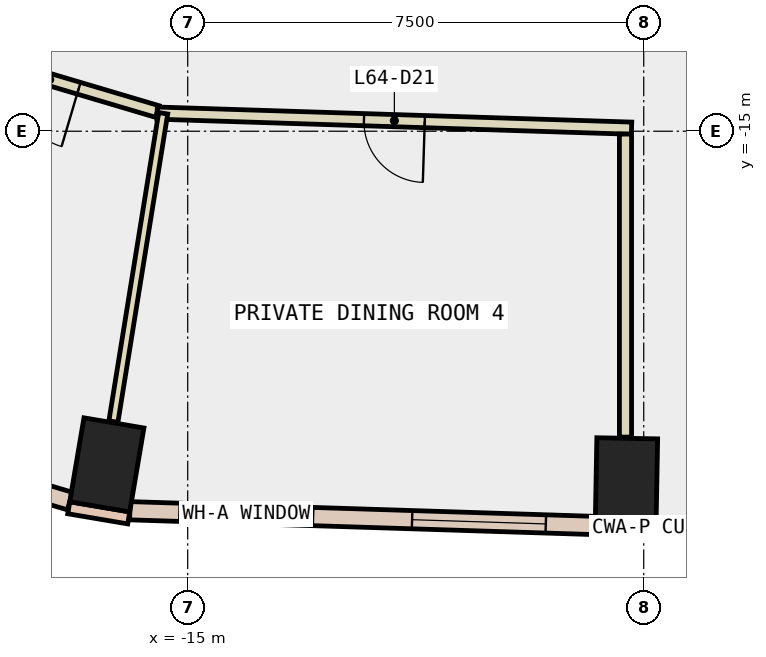
"""IFC4 building model, lengths in metres.
Left out: names, types, materials, properties, quantities, classifications, styles, units other than length and angle.
Written with IfcOpenShell. Run it as: python <this file> out.ifc"""

import sys

from ifc_helpers import new_model, si_unit, direction, frame, frame_2d, origin, origin_2d, place, context, subcontext, project, spatial, rectangle, extrude, element, fill, save


model = new_model("IFC4")
c1 = context("Model", 3, precision=1e-05, world=origin(), true_north=direction((0.0, 1.0)))
c2 = subcontext(c1, "Body", "Model", "MODEL_VIEW")
j1 = project(units=[si_unit("LENGTHUNIT", "METRE"), si_unit("PLANEANGLEUNIT", "RADIAN")], contexts=[c1])
p1 = place(None, origin())
s1 = spatial("IfcSite", under=j1, at=p1, CompositionType="ELEMENT")
p2 = place(p1, origin())
s2 = spatial("IfcBuilding", under=s1, at=p2, CompositionType="ELEMENT")
p3 = place(p2, frame((0.0, 0.0, 277.4)))
s3 = spatial("IfcBuildingStorey", under=s2, at=p3, CompositionType="ELEMENT", Elevation=277.4)
for number, where, z_axis, x_axis in (
    (1, (-16.33, -20.487, -0.34), (0.0, 0.0, 1.0), (-0.986, 0.167, 0.0)),
    (2, (-7.784, -20.75, -0.34), (0.0, 0.0, 1.0), (-1.0, 0.018, 0.0)),
):
    element("IfcColumn", number, at=place(p3, frame(where, z_axis=z_axis, x_axis=x_axis)), inside=s3, PredefinedType="COLUMN", context=c2, shape_type="SweptSolid", body=[
        extrude(rectangle(XDim=1.0, YDim=1.4, at=origin_2d()), origin(), (0.0, 0.0, 1.0), 3.34),
    ])
for number, where, z_axis, x_axis in (
    (3, (-16.956, -21.192, 0.0), (0.0, 0.0, 1.0), (0.986, -0.167, 0.0)),
    (4, (-8.298, -21.541, 0.0), (0.0, 0.0, 1.0), (1.0, -0.018, 0.0)),
):
    element("IfcWall", number, at=place(p3, frame(where, z_axis=z_axis, x_axis=x_axis)), inside=s3, PredefinedType="STANDARD", context=c2, shape_type="SweptSolid", body=[
        extrude(rectangle(XDim=1.0, YDim=0.2, at=frame_2d((0.5, 0.0))), origin(), (0.0, 0.0, 1.0), 3.0),
    ])
p4 = place(p3, frame((-15.951, -21.241, 0.0), z_axis=(0.0, 0.0, 1.0), x_axis=(0.999496876383, -0.031717410046, 0.0)))
e5 = element("IfcWall", 5, at=p4, inside=s3, PredefinedType="STANDARD", context=c2, shape_type="SweptSolid", body=[
    extrude(rectangle(XDim=7.659, YDim=0.3, at=frame_2d((3.83, 0.0))), origin(), (0.0, 0.0, 1.0), 3.0),
])
p5 = place(p4, frame((0.815, 0.0, 0.9)))
e6 = element("IfcOpeningElement", 6, at=p5, cuts=e5, PredefinedType="OPENING", context=c2, shape_type="SweptSolid", body=[
    extrude(rectangle(XDim=2.2, YDim=2.0, at=frame_2d((1.1, 1.0))), frame((0.0, 0.16, 0.0), z_axis=(0.0, -1.0, 0.0), x_axis=(1.0, 0.0, 0.0)), (0.0, 0.0, 1.0), 0.32),
])
p6 = place(p4, frame((4.644, 0.0, 0.9)))
e7 = element("IfcOpeningElement", 7, at=p6, cuts=e5, PredefinedType="OPENING", context=c2, shape_type="SweptSolid", body=[
    extrude(rectangle(XDim=2.2, YDim=2.0, at=frame_2d((1.1, 1.0))), frame((0.0, 0.16, 0.0), z_axis=(0.0, -1.0, 0.0), x_axis=(1.0, 0.0, 0.0)), (0.0, 0.0, 1.0), 0.32),
])
p7 = place(p3, frame((-21.764, -19.649, 0.0), z_axis=(0.0, 0.0, 1.0), x_axis=(0.95864045837, -0.284619872067, 0.0)))
e8 = element("IfcWall", 8, at=p7, inside=s3, PredefinedType="STANDARD", context=c2, shape_type="SweptSolid", body=[
    extrude(rectangle(XDim=5.035, YDim=0.3, at=frame_2d((2.518, 0.0))), origin(), (0.0, 0.0, 1.0), 3.0),
])
p8 = place(p7, frame((0.559, 0.0, 0.9)))
e9 = element("IfcOpeningElement", 9, at=p8, cuts=e8, PredefinedType="OPENING", context=c2, shape_type="SweptSolid", body=[
    extrude(rectangle(XDim=1.4, YDim=2.0, at=frame_2d((0.7, 1.0))), frame((0.0, 0.16, 0.0), z_axis=(0.0, -1.0, 0.0), x_axis=(1.0, 0.0, 0.0)), (0.0, 0.0, 1.0), 0.32),
])
p9 = place(p7, frame((3.076, 0.0, 0.9)))
e10 = element("IfcOpeningElement", 10, at=p9, cuts=e8, PredefinedType="OPENING", context=c2, shape_type="SweptSolid", body=[
    extrude(rectangle(XDim=1.4, YDim=2.0, at=frame_2d((0.7, 1.0))), frame((0.0, 0.16, 0.0), z_axis=(0.0, -1.0, 0.0), x_axis=(1.0, 0.0, 0.0)), (0.0, 0.0, 1.0), 0.32),
])
p10 = place(p3, frame((-15.499, -14.676, 0.0), z_axis=(0.0, 0.0, 1.0), x_axis=(-0.958734738219, 0.284302131073, 0.0)))
e11 = element("IfcWall", 11, at=p10, inside=s3, PredefinedType="PARTITIONING", context=c2, shape_type="SweptSolid", body=[
    extrude(rectangle(XDim=3.693, YDim=0.2, at=frame_2d((1.847, 0.0))), origin(), (0.0, 0.0, 1.0), 3.0),
])
p11 = place(p10, frame((1.347, 0.0, 0.0)))
e12 = element("IfcOpeningElement", 12, at=p11, cuts=e11, PredefinedType="OPENING", context=c2, shape_type="SweptSolid", body=[
    extrude(rectangle(XDim=1.0, YDim=2.1, at=frame_2d((0.5, 1.05))), frame((0.0, 0.11, 0.0), z_axis=(0.0, -1.0, 0.0), x_axis=(1.0, 0.0, 0.0)), (0.0, 0.0, 1.0), 0.22),
])
p12 = place(p3, frame((-7.7, -14.95, 0.0), z_axis=(0.0, 0.0, 1.0), x_axis=(-0.999495120537, 0.031772693047, 0.0)))
e13 = element("IfcWall", 13, at=p12, inside=s3, PredefinedType="PARTITIONING", context=c2, shape_type="SweptSolid", body=[
    extrude(rectangle(XDim=7.807, YDim=0.2, at=frame_2d((3.903, 0.0))), origin(), (0.0, 0.0, 1.0), 3.0),
])
p13 = place(p12, frame((3.403, 0.0, 0.0)))
e14 = element("IfcOpeningElement", 14, at=p13, cuts=e13, PredefinedType="OPENING", context=c2, shape_type="SweptSolid", body=[
    extrude(rectangle(XDim=1.0, YDim=2.1, at=frame_2d((0.5, 1.05))), frame((0.0, 0.11, 0.0), z_axis=(0.0, -1.0, 0.0), x_axis=(1.0, 0.0, 0.0)), (0.0, 0.0, 1.0), 0.22),
])
p14 = place(p3, frame((-7.8, -20.03, 0.0), z_axis=(0.0, 0.0, 1.0), x_axis=(0.0, 1.0, 0.0)))
e15 = element("IfcWall", 15, at=p14, inside=s3, PredefinedType="PARTITIONING", context=c2, shape_type="SweptSolid", body=[
    extrude(rectangle(XDim=4.983, YDim=0.2, at=frame_2d((2.491, 0.0))), origin(), (0.0, 0.0, 1.0), 3.0),
])
p15 = place(p3, frame((-15.403, -14.705, 0.0), z_axis=(0.0, 0.0, 1.0), x_axis=(-0.159447664828, -0.98720638277, 0.0)))
e16 = element("IfcWall", 16, at=p15, inside=s3, PredefinedType="PARTITIONING", context=c2, shape_type="SweptSolid", body=[
    extrude(rectangle(XDim=5.135, YDim=0.15, at=frame_2d((2.568, 0.0))), origin(), (0.0, 0.0, 1.0), 3.0),
])
p16 = place(p5, origin())
e17 = element("IfcWindow", 17, at=p16, inside=s3, PartitioningType="SINGLE_PANEL", PredefinedType="WINDOW", context=c2, shape_type="SweptSolid", body=[
    extrude(rectangle(XDim=2.2, YDim=2.0, at=frame_2d((1.1, 1.0))), frame((0.0, 0.03, 0.0), z_axis=(0.0, -1.0, 0.0), x_axis=(1.0, 0.0, 0.0)), (0.0, 0.0, 1.0), 0.06),
])
fill(e6, e17)
p17 = place(p6, origin())
e18 = element("IfcWindow", 18, at=p17, inside=s3, PartitioningType="SINGLE_PANEL", PredefinedType="WINDOW", context=c2, shape_type="SweptSolid", body=[
    extrude(rectangle(XDim=2.2, YDim=2.0, at=frame_2d((1.1, 1.0))), frame((0.0, 0.03, 0.0), z_axis=(0.0, -1.0, 0.0), x_axis=(1.0, 0.0, 0.0)), (0.0, 0.0, 1.0), 0.06),
])
fill(e7, e18)
p18 = place(p11, origin())
e19 = element("IfcDoor", 19, at=p18, inside=s3, OperationType="SINGLE_SWING_LEFT", PredefinedType="DOOR", context=c2, shape_type="SweptSolid", body=[
    extrude(rectangle(XDim=1.0, YDim=2.1, at=frame_2d((0.5, 1.05))), frame((0.0, 0.025, 0.0), z_axis=(0.0, -1.0, 0.0), x_axis=(1.0, 0.0, 0.0)), (0.0, 0.0, 1.0), 0.05),
])
fill(e12, e19)
p19 = place(p13, origin())
e20 = element("IfcDoor", 20, at=p19, inside=s3, OperationType="SINGLE_SWING_LEFT", PredefinedType="DOOR", context=c2, shape_type="SweptSolid", body=[
    extrude(rectangle(XDim=1.0, YDim=2.1, at=frame_2d((0.5, 1.05))), frame((0.0, 0.025, 0.0), z_axis=(0.0, -1.0, 0.0), x_axis=(1.0, 0.0, 0.0)), (0.0, 0.0, 1.0), 0.05),
])
fill(e14, e20)
save(model, sys.argv[1])
